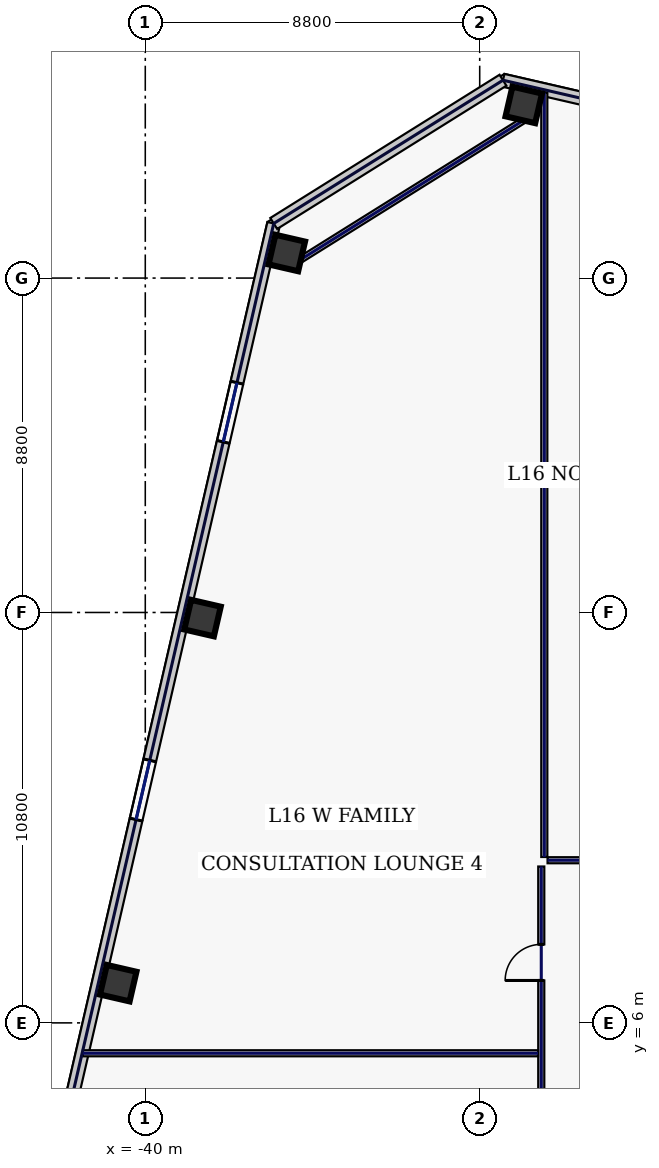
"""IFC4 building model, lengths in metres.
Left out: names, types, materials, properties, quantities, classifications, styles, units other than length and angle.
Written with IfcOpenShell. Run it as: python <this file> out.ifc"""

import sys

from ifc_helpers import new_model, si_unit, direction, frame, frame_2d, origin, origin_2d, place, context, subcontext, project, spatial, rectangle, hollow_rectangle, extrude, element, fill, save


model = new_model("IFC4")
c1 = context("Model", 3, precision=1e-05, world=origin(), true_north=direction((0.0, 1.0)))
c2 = subcontext(c1, "Body", "Model", "MODEL_VIEW")
j1 = project(units=[si_unit("LENGTHUNIT", "METRE"), si_unit("PLANEANGLEUNIT", "RADIAN")], contexts=[c1])
p1 = place(None, origin())
s1 = spatial("IfcSite", under=j1, at=p1, CompositionType="ELEMENT")
p2 = place(p1, origin())
s2 = spatial("IfcBuilding", under=s1, at=p2, CompositionType="ELEMENT")
p3 = place(p2, frame((0.0, 0.0, 75.4)))
s3 = spatial("IfcBuildingStorey", under=s2, at=p3, CompositionType="ELEMENT", Elevation=75.4)
for number, where, z_axis, x_axis in (
    (1, (-30.04, 30.156, 0.0), (0.0, 0.0, 1.0), (0.974, -0.225, 0.0)),
    (2, (-36.276, 26.26, 0.0), (0.0, 0.0, 1.0), (0.974, -0.225, 0.0)),
    (3, (-38.494, 16.652, 0.0), (0.0, 0.0, 1.0), (0.974, -0.225, 0.0)),
    (4, (-40.712, 7.045, 0.0), (0.0, 0.0, 1.0), (0.974, -0.225, 0.0)),
):
    element("IfcColumn", number, at=place(p3, frame(where, z_axis=z_axis, x_axis=x_axis)), inside=s3, PredefinedType="COLUMN", context=c2, shape_type="SweptSolid", body=[
        extrude(hollow_rectangle(XDim=0.8, YDim=0.8, WallThickness=0.036, at=origin_2d()), origin(), (0.0, 0.0, 1.0), 3.74),
    ])
p4 = place(p3, frame((-8.517, 25.711, 0.0), z_axis=(0.0, 0.0, 1.0), x_axis=(-0.974372845456, 0.224939009598, 0.0)))
e5 = element("IfcWall", 5, at=p4, inside=s3, PredefinedType="STANDARD", context=c2, shape_type="SweptSolid", body=[
    extrude(rectangle(XDim=22.652, YDim=0.34, at=frame_2d((11.326, 0.0))), origin(), (0.0, 0.0, 1.0), 3.74),
])
p5 = place(p4, frame((18.189, 0.0, 0.77)))
e6 = element("IfcOpeningElement", 6, at=p5, cuts=e5, PredefinedType="OPENING", context=c2, shape_type="SweptSolid", body=[
    extrude(rectangle(XDim=2.3, YDim=2.1, at=frame_2d((1.15, 1.05))), frame((0.0, 0.18, 0.0), z_axis=(0.0, -1.0, 0.0), x_axis=(1.0, 0.0, 0.0)), (0.0, 0.0, 1.0), 0.36),
])
p6 = place(p4, frame((15.155, 0.0, 0.77)))
e7 = element("IfcOpeningElement", 7, at=p6, cuts=e5, PredefinedType="OPENING", context=c2, shape_type="SweptSolid", body=[
    extrude(rectangle(XDim=0.85, YDim=1.85, at=frame_2d((0.425, 0.925))), frame((0.0, 0.18, 0.0), z_axis=(0.0, -1.0, 0.0), x_axis=(1.0, 0.0, 0.0)), (0.0, 0.0, 1.0), 0.36),
])
p7 = place(p4, frame((8.441, 0.0, 0.77)))
e8 = element("IfcOpeningElement", 8, at=p7, cuts=e5, PredefinedType="OPENING", context=c2, shape_type="SweptSolid", body=[
    extrude(rectangle(XDim=2.3, YDim=2.1, at=frame_2d((1.15, 1.05))), frame((0.0, 0.18, 0.0), z_axis=(0.0, -1.0, 0.0), x_axis=(1.0, 0.0, 0.0)), (0.0, 0.0, 1.0), 0.36),
])
p8 = place(p4, frame((4.306, 0.0, 0.22)))
e9 = element("IfcOpeningElement", 9, at=p8, cuts=e5, PredefinedType="OPENING", context=c2, shape_type="SweptSolid", body=[
    extrude(rectangle(XDim=1.6, YDim=1.2, at=frame_2d((0.8, 0.6))), frame((0.0, 0.18, 0.0), z_axis=(0.0, -1.0, 0.0), x_axis=(1.0, 0.0, 0.0)), (0.0, 0.0, 1.0), 0.36),
])
p9 = place(p3, frame((-36.62, 27.037, 0.0), z_axis=(0.0, 0.0, 1.0), x_axis=(-0.224951280646, -0.974370012539, 0.0)))
e10 = element("IfcWall", 10, at=p9, inside=s3, PredefinedType="STANDARD", context=c2, shape_type="SweptSolid", body=[
    extrude(rectangle(XDim=40.8, YDim=0.34, at=frame_2d((20.4, 0.0))), origin(), (0.0, 0.0, 1.0), 3.74),
])
p10 = place(p9, frame((4.3, 0.0, 0.58)))
e11 = element("IfcOpeningElement", 11, at=p10, cuts=e10, PredefinedType="OPENING", context=c2, shape_type="SweptSolid", body=[
    extrude(rectangle(XDim=1.6, YDim=2.3, at=frame_2d((0.8, 1.15))), frame((0.0, 0.18, 0.0), z_axis=(0.0, -1.0, 0.0), x_axis=(1.0, 0.0, 0.0)), (0.0, 0.0, 1.0), 0.36),
])
p11 = place(p9, frame((14.5, 0.0, 0.58)))
e12 = element("IfcOpeningElement", 12, at=p11, cuts=e10, PredefinedType="OPENING", context=c2, shape_type="SweptSolid", body=[
    extrude(rectangle(XDim=1.6, YDim=2.3, at=frame_2d((0.8, 1.15))), frame((0.0, 0.18, 0.0), z_axis=(0.0, -1.0, 0.0), x_axis=(1.0, 0.0, 0.0)), (0.0, 0.0, 1.0), 0.36),
])
p12 = place(p9, frame((24.7, 0.0, 0.58)))
e13 = element("IfcOpeningElement", 13, at=p12, cuts=e10, PredefinedType="OPENING", context=c2, shape_type="SweptSolid", body=[
    extrude(rectangle(XDim=1.6, YDim=2.3, at=frame_2d((0.8, 1.15))), frame((0.0, 0.18, 0.0), z_axis=(0.0, -1.0, 0.0), x_axis=(1.0, 0.0, 0.0)), (0.0, 0.0, 1.0), 0.36),
])
p13 = place(p9, frame((34.9, 0.0, 0.58)))
e14 = element("IfcOpeningElement", 14, at=p13, cuts=e10, PredefinedType="OPENING", context=c2, shape_type="SweptSolid", body=[
    extrude(rectangle(XDim=1.6, YDim=2.3, at=frame_2d((0.8, 1.15))), frame((0.0, 0.18, 0.0), z_axis=(0.0, -1.0, 0.0), x_axis=(1.0, 0.0, 0.0)), (0.0, 0.0, 1.0), 0.36),
])
p14 = place(p3, frame((-30.588, 30.807, 0.0), z_axis=(0.0, 0.0, 1.0), x_axis=(-0.848031080615, -0.529946493819, 0.0)))
e15 = element("IfcWall", 15, at=p14, inside=s3, PredefinedType="STANDARD", context=c2, shape_type="SweptSolid", body=[
    extrude(rectangle(XDim=7.114, YDim=0.34, at=frame_2d((3.557, 0.0))), origin(), (0.0, 0.0, 1.0), 3.74),
])
p15 = place(p3, frame((-29.86, 29.868, 0.0), z_axis=(0.0, 0.0, 1.0), x_axis=(-0.848043064089, -0.529927317139, 0.0)))
e16 = element("IfcWall", 16, at=p15, inside=s3, PredefinedType="PARTITIONING", context=c2, shape_type="SweptSolid", body=[
    extrude(rectangle(XDim=7.354, YDim=0.16, at=frame_2d((3.677, 0.0))), origin(), (0.0, 0.0, 1.0), 3.74),
])
p16 = place(p3, frame((-29.58, -10.015, 0.0), z_axis=(0.0, 0.0, 1.0), x_axis=(0.0, 1.0, 0.0)))
e17 = element("IfcWall", 17, at=p16, inside=s3, PredefinedType="PARTITIONING", context=c2, shape_type="SweptSolid", body=[
    extrude(rectangle(XDim=20.13, YDim=0.16, at=frame_2d((10.065, 0.0))), origin(), (0.0, 0.0, 1.0), 3.74),
])
p17 = place(p16, frame((2.169, 0.0, 0.0)))
e18 = element("IfcOpeningElement", 18, at=p17, cuts=e17, PredefinedType="OPENING", context=c2, shape_type="SweptSolid", body=[
    extrude(rectangle(XDim=0.95, YDim=2.2, at=frame_2d((0.475, 1.1))), frame((0.0, 0.09, 0.0), z_axis=(0.0, -1.0, 0.0), x_axis=(1.0, 0.0, 0.0)), (0.0, 0.0, 1.0), 0.18),
])
p18 = place(p16, frame((6.4, 0.0, 0.0)))
e19 = element("IfcOpeningElement", 19, at=p18, cuts=e17, PredefinedType="OPENING", context=c2, shape_type="SweptSolid", body=[
    extrude(rectangle(XDim=0.95, YDim=2.2, at=frame_2d((0.475, 1.1))), frame((0.0, 0.09, 0.0), z_axis=(0.0, -1.0, 0.0), x_axis=(1.0, 0.0, 0.0)), (0.0, 0.0, 1.0), 0.18),
])
p19 = place(p16, frame((11.6, 0.0, 0.0)))
e20 = element("IfcOpeningElement", 20, at=p19, cuts=e17, PredefinedType="OPENING", context=c2, shape_type="SweptSolid", body=[
    extrude(rectangle(XDim=0.95, YDim=2.2, at=frame_2d((0.475, 1.1))), frame((0.0, 0.09, 0.0), z_axis=(0.0, -1.0, 0.0), x_axis=(1.0, 0.0, 0.0)), (0.0, 0.0, 1.0), 0.18),
])
p20 = place(p16, frame((17.131, 0.0, 0.0)))
e21 = element("IfcOpeningElement", 21, at=p20, cuts=e17, PredefinedType="OPENING", context=c2, shape_type="SweptSolid", body=[
    extrude(rectangle(XDim=0.95, YDim=2.2, at=frame_2d((0.475, 1.1))), frame((0.0, 0.09, 0.0), z_axis=(0.0, -1.0, 0.0), x_axis=(1.0, 0.0, 0.0)), (0.0, 0.0, 1.0), 0.18),
])
p21 = place(p3, frame((-29.415, 10.28, 0.0), z_axis=(0.0, 0.0, 1.0), x_axis=(1.0, 0.0, 0.0)))
e22 = element("IfcWall", 22, at=p21, inside=s3, PredefinedType="PARTITIONING", context=c2, shape_type="SweptSolid", body=[
    extrude(rectangle(XDim=58.83, YDim=0.16, at=frame_2d((29.415, 0.0))), origin(), (0.0, 0.0, 1.0), 3.74),
])
p22 = place(p21, frame((3.269, 0.0, 0.0)))
e23 = element("IfcOpeningElement", 23, at=p22, cuts=e22, PredefinedType="OPENING", context=c2, shape_type="SweptSolid", body=[
    extrude(rectangle(XDim=0.95, YDim=2.2, at=frame_2d((0.475, 1.1))), frame((0.0, 0.09, 0.0), z_axis=(0.0, -1.0, 0.0), x_axis=(1.0, 0.0, 0.0)), (0.0, 0.0, 1.0), 0.18),
])
p23 = place(p21, frame((10.075, 0.0, 0.0)))
e24 = element("IfcOpeningElement", 24, at=p23, cuts=e22, PredefinedType="OPENING", context=c2, shape_type="SweptSolid", body=[
    extrude(rectangle(XDim=1.3, YDim=2.2, at=frame_2d((0.65, 1.1))), frame((0.0, 0.09, 0.0), z_axis=(0.0, -1.0, 0.0), x_axis=(1.0, 0.0, 0.0)), (0.0, 0.0, 1.0), 0.18),
])
p24 = place(p21, frame((16.875, 0.0, 0.0)))
e25 = element("IfcOpeningElement", 25, at=p24, cuts=e22, PredefinedType="OPENING", context=c2, shape_type="SweptSolid", body=[
    extrude(rectangle(XDim=1.3, YDim=2.2, at=frame_2d((0.65, 1.1))), frame((0.0, 0.09, 0.0), z_axis=(0.0, -1.0, 0.0), x_axis=(1.0, 0.0, 0.0)), (0.0, 0.0, 1.0), 0.18),
])
p25 = place(p21, frame((24.25, 0.0, 0.0)))
e26 = element("IfcOpeningElement", 26, at=p25, cuts=e22, PredefinedType="OPENING", context=c2, shape_type="SweptSolid", body=[
    extrude(rectangle(XDim=1.05, YDim=2.2, at=frame_2d((0.525, 1.1))), frame((0.0, 0.09, 0.0), z_axis=(0.0, -1.0, 0.0), x_axis=(1.0, 0.0, 0.0)), (0.0, 0.0, 1.0), 0.18),
])
p26 = place(p21, frame((31.675, 0.0, 0.0)))
e27 = element("IfcOpeningElement", 27, at=p26, cuts=e22, PredefinedType="OPENING", context=c2, shape_type="SweptSolid", body=[
    extrude(rectangle(XDim=1.3, YDim=2.2, at=frame_2d((0.65, 1.1))), frame((0.0, 0.09, 0.0), z_axis=(0.0, -1.0, 0.0), x_axis=(1.0, 0.0, 0.0)), (0.0, 0.0, 1.0), 0.18),
])
p27 = place(p21, frame((42.525, 0.0, 0.0)))
e28 = element("IfcOpeningElement", 28, at=p27, cuts=e22, PredefinedType="OPENING", context=c2, shape_type="SweptSolid", body=[
    extrude(rectangle(XDim=0.95, YDim=2.2, at=frame_2d((0.475, 1.1))), frame((0.0, 0.09, 0.0), z_axis=(0.0, -1.0, 0.0), x_axis=(1.0, 0.0, 0.0)), (0.0, 0.0, 1.0), 0.18),
])
p28 = place(p21, frame((53.881, 0.0, 0.0)))
e29 = element("IfcOpeningElement", 29, at=p28, cuts=e22, PredefinedType="OPENING", context=c2, shape_type="SweptSolid", body=[
    extrude(rectangle(XDim=0.95, YDim=2.2, at=frame_2d((0.475, 1.1))), frame((0.0, 0.09, 0.0), z_axis=(0.0, -1.0, 0.0), x_axis=(1.0, 0.0, 0.0)), (0.0, 0.0, 1.0), 0.18),
])
p29 = place(p3, frame((-29.5, 10.365, 0.0), z_axis=(0.0, 0.0, 1.0), x_axis=(0.0, 1.0, 0.0)))
e30 = element("IfcWall", 30, at=p29, inside=s3, PredefinedType="PARTITIONING", context=c2, shape_type="SweptSolid", body=[
    extrude(rectangle(XDim=20.119, YDim=0.16, at=frame_2d((10.059, 0.0))), origin(), (0.0, 0.0, 1.0), 3.74),
])
p30 = place(p3, frame((-41.641, 5.2, 0.0), z_axis=(0.0, 0.0, 1.0), x_axis=(1.0, 0.0, 0.0)))
e31 = element("IfcWall", 31, at=p30, inside=s3, PredefinedType="PARTITIONING", context=c2, shape_type="SweptSolid", body=[
    extrude(rectangle(XDim=11.976, YDim=0.16, at=frame_2d((5.988, 0.0))), origin(), (0.0, 0.0, 1.0), 3.74),
])
p31 = place(p10, origin())
e32 = element("IfcWindow", 32, at=p31, inside=s3, PartitioningType="SINGLE_PANEL", PredefinedType="WINDOW", context=c2, shape_type="SweptSolid", body=[
    extrude(rectangle(XDim=1.6, YDim=2.3, at=frame_2d((0.8, 1.15))), frame((0.0, 0.03, 0.0), z_axis=(0.0, -1.0, 0.0), x_axis=(1.0, 0.0, 0.0)), (0.0, 0.0, 1.0), 0.06),
])
fill(e11, e32)
p32 = place(p11, origin())
e33 = element("IfcWindow", 33, at=p32, inside=s3, PartitioningType="SINGLE_PANEL", PredefinedType="WINDOW", context=c2, shape_type="SweptSolid", body=[
    extrude(rectangle(XDim=1.6, YDim=2.3, at=frame_2d((0.8, 1.15))), frame((0.0, 0.03, 0.0), z_axis=(0.0, -1.0, 0.0), x_axis=(1.0, 0.0, 0.0)), (0.0, 0.0, 1.0), 0.06),
])
fill(e12, e33)
p33 = place(p20, origin())
e34 = element("IfcDoor", 34, at=p33, inside=s3, OperationType="SINGLE_SWING_LEFT", PredefinedType="DOOR", context=c2, shape_type="SweptSolid", body=[
    extrude(rectangle(XDim=0.95, YDim=2.2, at=frame_2d((0.475, 1.1))), frame((0.0, 0.025, 0.0), z_axis=(0.0, -1.0, 0.0), x_axis=(1.0, 0.0, 0.0)), (0.0, 0.0, 1.0), 0.05),
])
fill(e21, e34)
save(model, sys.argv[1])
